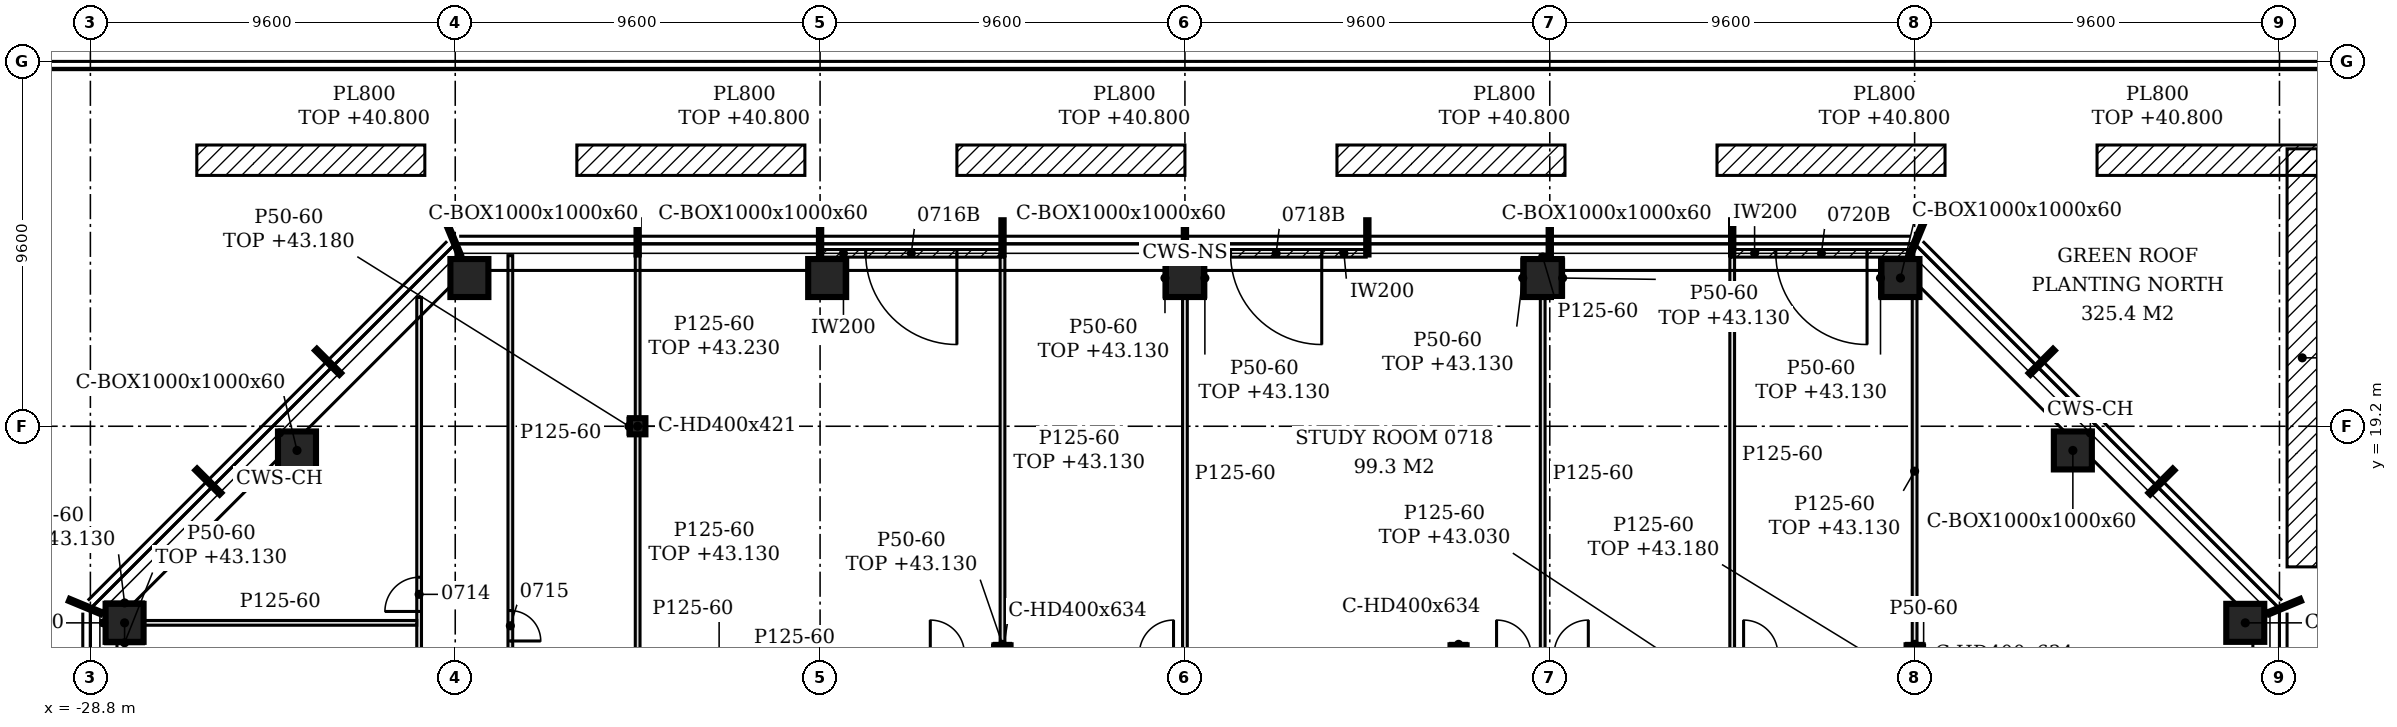
"""IFC4 building model, lengths in metres.
Left out: names, types, materials, properties, quantities, classifications, styles, units other than length and angle.
Written with IfcOpenShell. Run it as: python <this file> out.ifc"""

import sys

from ifc_helpers import new_model, si_unit, direction, frame, frame_2d, origin, origin_2d, place, context, subcontext, project, spatial, polyline, rectangle, hollow_rectangle, i_section, outline, extrude, element, fill, save


model = new_model("IFC4")
c1 = context("Model", 3, precision=1e-05, world=origin(), true_north=direction((0.0, 1.0)))
c2 = subcontext(c1, "Body", "Model", "MODEL_VIEW")
j1 = project(units=[si_unit("LENGTHUNIT", "METRE"), si_unit("PLANEANGLEUNIT", "RADIAN")], contexts=[c1])
p1 = place(None, origin())
s1 = spatial("IfcSite", under=j1, at=p1, CompositionType="ELEMENT")
p2 = place(p1, origin())
s2 = spatial("IfcBuilding", under=s1, at=p2, CompositionType="ELEMENT")
p3 = place(p2, frame((0.0, 0.0, 40.2)))
s3 = spatial("IfcBuildingStorey", under=s2, at=p3, CompositionType="ELEMENT", Elevation=40.2)
for number, where, z_axis, x_axis in (
    (1, (27.9, 14.027, -0.15), (0.0, 0.0, 1.0), (1.0, 0.0, 0.0)),
    (2, (23.364, 18.564, -0.15), (0.0, 0.0, 1.0), (1.0, 0.0, 0.0)),
    (3, (18.827, 23.1, -0.15), (0.0, 0.0, 1.0), (1.0, 0.0, 0.0)),
    (4, (9.414, 23.1, -0.15), (0.0, 0.0, 1.0), (1.0, 0.0, 0.0)),
    (5, (0.0, 23.1, -0.15), (0.0, 0.0, 1.0), (1.0, 0.0, 0.0)),
    (6, (-9.414, 23.1, -0.15), (0.0, 0.0, 1.0), (1.0, 0.0, 0.0)),
    (7, (-18.827, 23.1, -0.15), (0.0, 0.0, 1.0), (1.0, 0.0, 0.0)),
    (8, (-23.364, 18.564, -0.15), (0.0, 0.0, 1.0), (1.0, 0.0, 0.0)),
    (9, (-27.9, 14.027, -0.15), (0.0, 0.0, 1.0), (1.0, 0.0, 0.0)),
):
    element("IfcColumn", number, at=place(p3, frame(where, z_axis=z_axis, x_axis=x_axis)), inside=s3, PredefinedType="COLUMN", context=c2, shape_type="SweptSolid", body=[
        extrude(hollow_rectangle(XDim=1.0, YDim=1.0, WallThickness=0.06, at=origin_2d()), origin(), (0.0, 0.0, 1.0), 3.6),
    ])
for number, where, z_axis, x_axis in (
    (10, (-4.8, 13.2, -0.15), (0.0, 0.0, 1.0), (1.0, 0.0, 0.0)),
    (11, (7.2, 13.2, -0.15), (0.0, 0.0, 1.0), (1.0, 0.0, 0.0)),
    (12, (19.2, 13.2, -0.15), (0.0, 0.0, 1.0), (1.0, 0.0, 0.0)),
):
    element("IfcColumn", number, at=place(p3, frame(where, z_axis=z_axis, x_axis=x_axis)), inside=s3, PredefinedType="COLUMN", context=c2, shape_type="SweptSolid", body=[
        extrude(i_section(OverallWidth=0.424, OverallDepth=0.474, WebThickness=0.048, FlangeThickness=0.077, FilletRadius=0.015, at=origin_2d()), origin(), (0.0, 0.0, 1.0), 3.6),
    ])
p4 = place(p3, frame((-14.4, 19.2, -0.15), z_axis=(0.0, 0.0, 1.0), x_axis=(1.0, 0.0, 0.0)))
e13 = element("IfcColumn", 13, at=p4, inside=s3, PredefinedType="COLUMN", context=c2, shape_type="SweptSolid", body=[
    extrude(i_section(OverallWidth=0.409, OverallDepth=0.425, WebThickness=0.033, FlangeThickness=0.052, FilletRadius=0.015, at=origin_2d()), origin(), (0.0, 0.0, 1.0), 3.6),
])
for number, where, z_axis, x_axis in (
    (14, (-26.0, 26.2, 0.0), (0.0, 0.0, 1.0), (1.0, 0.0, 0.0)),
    (15, (-16.0, 26.2, 0.0), (0.0, 0.0, 1.0), (1.0, 0.0, 0.0)),
    (16, (-6.0, 26.2, 0.0), (0.0, 0.0, 1.0), (1.0, 0.0, 0.0)),
    (17, (4.0, 26.2, 0.0), (0.0, 0.0, 1.0), (1.0, 0.0, 0.0)),
    (18, (14.0, 26.2, 0.0), (0.0, 0.0, 1.0), (1.0, 0.0, 0.0)),
    (19, (24.0, 26.2, 0.0), (0.0, 0.0, 1.0), (1.0, 0.0, 0.0)),
):
    element("IfcWall", number, at=place(p3, frame(where, z_axis=z_axis, x_axis=x_axis)), inside=s3, PredefinedType="NOTDEFINED", context=c2, shape_type="SweptSolid", body=[
        extrude(rectangle(XDim=6.0, YDim=0.8, at=frame_2d((3.0, 0.0))), origin(), (0.0, 0.0, 1.0), 0.6),
    ])
p5 = place(p3, frame((29.4, 15.5, 0.0), z_axis=(0.0, 0.0, 1.0), x_axis=(0.0, 1.0, 0.0)))
e20 = element("IfcWall", 20, at=p5, inside=s3, PredefinedType="NOTDEFINED", context=c2, shape_type="SweptSolid", body=[
    extrude(rectangle(XDim=11.0, YDim=0.8, at=frame_2d((5.5, 0.0))), origin(), (0.0, 0.0, 1.0), 0.6),
])
p6 = place(p3, frame((19.056, 23.75, 0.0), z_axis=(0.0, 0.0, 1.0), x_axis=(-1.0, 0.0, 0.0)))
e21 = element("IfcWall", 21, at=p6, inside=s3, PredefinedType="NOTDEFINED", context=c2, shape_type="SweptSolid", body=[
    extrude(rectangle(XDim=4.626, YDim=0.2, at=frame_2d((2.313, 0.0))), origin(), (0.0, 0.0, 1.0), 3.45),
])
p7 = place(p6, frame((1.108, 0.0, 0.0)))
e22 = element("IfcOpeningElement", 22, at=p7, cuts=e21, PredefinedType="OPENING", context=c2, shape_type="SweptSolid", body=[
    extrude(rectangle(XDim=2.4, YDim=2.4, at=frame_2d((1.2, 1.2))), frame((0.0, 0.11, 0.0), z_axis=(0.0, -1.0, 0.0), x_axis=(1.0, 0.0, 0.0)), (0.0, 0.0, 1.0), 0.22),
])
p8 = place(p3, frame((4.77, 23.75, 0.0), z_axis=(0.0, 0.0, 1.0), x_axis=(-1.0, 0.0, 0.0)))
e23 = element("IfcWall", 23, at=p8, inside=s3, PredefinedType="NOTDEFINED", context=c2, shape_type="SweptSolid", body=[
    extrude(rectangle(XDim=4.74, YDim=0.2, at=frame_2d((2.37, 0.0))), origin(), (0.0, 0.0, 1.0), 3.45),
])
p9 = place(p8, frame((1.17, 0.0, 0.0)))
e24 = element("IfcOpeningElement", 24, at=p9, cuts=e23, PredefinedType="OPENING", context=c2, shape_type="SweptSolid", body=[
    extrude(rectangle(XDim=2.4, YDim=2.4, at=frame_2d((1.2, 1.2))), frame((0.0, 0.11, 0.0), z_axis=(0.0, -1.0, 0.0), x_axis=(1.0, 0.0, 0.0)), (0.0, 0.0, 1.0), 0.22),
])
p10 = place(p3, frame((-4.83, 23.75, 0.0), z_axis=(0.0, 0.0, 1.0), x_axis=(-1.0, 0.0, 0.0)))
e25 = element("IfcWall", 25, at=p10, inside=s3, PredefinedType="NOTDEFINED", context=c2, shape_type="SweptSolid", body=[
    extrude(rectangle(XDim=4.74, YDim=0.2, at=frame_2d((2.37, 0.0))), origin(), (0.0, 0.0, 1.0), 3.45),
])
p11 = place(p10, frame((1.17, 0.0, 0.0)))
e26 = element("IfcOpeningElement", 26, at=p11, cuts=e25, PredefinedType="OPENING", context=c2, shape_type="SweptSolid", body=[
    extrude(rectangle(XDim=2.4, YDim=2.4, at=frame_2d((1.2, 1.2))), frame((0.0, 0.11, 0.0), z_axis=(0.0, -1.0, 0.0), x_axis=(1.0, 0.0, 0.0)), (0.0, 0.0, 1.0), 0.22),
])
p12 = place(p3, frame((-20.15, -15.288, 0.0), z_axis=(0.0, 0.0, 1.0), x_axis=(0.0, 1.0, 0.0)))
e27 = element("IfcWall", 27, at=p12, inside=s3, PredefinedType="PARTITIONING", context=c2, shape_type="SweptSolid", body=[
    extrude(outline(polyline([(0.0, 0.0), (37.876, 0.0), (37.876, 3.45), (37.622, 3.45), (37.62, 2.63), (36.507, 2.63), (36.505, 3.45), (34.583, 3.45), (34.581, 2.98), (34.393, 2.98), (34.39, 3.45), (29.798, 3.45), (29.795, 2.83), (29.577, 2.83), (29.575, 3.45), (24.998, 3.45), (24.996, 2.83), (24.778, 2.83), (24.775, 3.45), (20.198, 3.45), (20.196, 2.83), (19.978, 2.83), (19.976, 3.45), (15.397, 3.45), (15.396, 2.83), (15.177, 2.83), (15.176, 3.45), (10.597, 3.45), (10.595, 2.83), (10.377, 2.83), (10.375, 3.45), (5.798, 3.45), (5.795, 2.83), (5.577, 2.83), (5.575, 3.45), (0.998, 3.45), (0.996, 2.83), (0.778, 2.83), (0.775, 3.45), (0.0, 3.45), (0.0, 0.0)])), frame((0.0, 0.062, 0.0), z_axis=(0.0, -1.0, 0.0), x_axis=(1.0, 0.0, 0.0)), (0.0, 0.0, 1.0), 0.125),
])
p13 = place(p12, frame((9.337, 0.0, 0.0)))
e28 = element("IfcOpeningElement", 28, at=p13, cuts=e27, PredefinedType="OPENING", context=c2, shape_type="SweptSolid", body=[
    extrude(rectangle(XDim=0.9, YDim=2.1, at=frame_2d((0.45, 1.05))), frame((0.0, 0.073, 0.0), z_axis=(0.0, -1.0, 0.0), x_axis=(1.0, 0.0, 0.0)), (0.0, 0.0, 1.0), 0.145),
])
p14 = place(p12, frame((10.912, 0.0, 0.0)))
e29 = element("IfcOpeningElement", 29, at=p14, cuts=e27, PredefinedType="OPENING", context=c2, shape_type="SweptSolid", body=[
    extrude(rectangle(XDim=0.9, YDim=2.1, at=frame_2d((0.45, 1.05))), frame((0.0, 0.073, 0.0), z_axis=(0.0, -1.0, 0.0), x_axis=(1.0, 0.0, 0.0)), (0.0, 0.0, 1.0), 0.145),
])
p15 = place(p12, frame((16.488, 0.0, 0.0)))
e30 = element("IfcOpeningElement", 30, at=p15, cuts=e27, PredefinedType="OPENING", context=c2, shape_type="SweptSolid", body=[
    extrude(rectangle(XDim=0.9, YDim=2.1, at=frame_2d((0.45, 1.05))), frame((0.0, 0.073, 0.0), z_axis=(0.0, -1.0, 0.0), x_axis=(1.0, 0.0, 0.0)), (0.0, 0.0, 1.0), 0.145),
])
p16 = place(p12, frame((23.664, 0.0, 0.0)))
e31 = element("IfcOpeningElement", 31, at=p16, cuts=e27, PredefinedType="OPENING", context=c2, shape_type="SweptSolid", body=[
    extrude(rectangle(XDim=0.9, YDim=2.1, at=frame_2d((0.45, 1.05))), frame((0.0, 0.073, 0.0), z_axis=(0.0, -1.0, 0.0), x_axis=(1.0, 0.0, 0.0)), (0.0, 0.0, 1.0), 0.145),
])
p17 = place(p12, frame((26.387, 0.0, 0.0)))
e32 = element("IfcOpeningElement", 32, at=p17, cuts=e27, PredefinedType="OPENING", context=c2, shape_type="SweptSolid", body=[
    extrude(rectangle(XDim=0.9, YDim=2.1, at=frame_2d((0.45, 1.05))), frame((0.0, 0.073, 0.0), z_axis=(0.0, -1.0, 0.0), x_axis=(1.0, 0.0, 0.0)), (0.0, 0.0, 1.0), 0.145),
])
p18 = place(p12, frame((29.615, 0.0, 0.0)))
e33 = element("IfcOpeningElement", 33, at=p18, cuts=e27, PredefinedType="OPENING", context=c2, shape_type="SweptSolid", body=[
    extrude(rectangle(XDim=0.9, YDim=2.1, at=frame_2d((0.45, 1.05))), frame((0.0, 0.073, 0.0), z_axis=(0.0, -1.0, 0.0), x_axis=(1.0, 0.0, 0.0)), (0.0, 0.0, 1.0), 0.145),
])
p19 = place(p3, frame((-17.75, 13.262, 0.0), z_axis=(0.0, 0.0, 1.0), x_axis=(0.0, 1.0, 0.0)))
e34 = element("IfcWall", 34, at=p19, inside=s3, PredefinedType="PARTITIONING", context=c2, shape_type="SweptSolid", body=[
    extrude(outline(polyline([(0.0, 0.0), (10.427, 0.0), (10.427, 3.45), (9.988, 3.45), (9.986, 2.93), (9.688, 2.93), (9.686, 3.45), (6.032, 3.45), (6.031, 2.98), (5.843, 2.98), (5.841, 3.45), (1.248, 3.45), (1.246, 2.83), (1.028, 2.83), (1.025, 3.45), (0.0, 3.45), (0.0, 0.0)])), frame((0.0, 0.062, 0.0), z_axis=(0.0, -1.0, 0.0), x_axis=(1.0, 0.0, 0.0)), (0.0, 0.0, 1.0), 0.125),
])
p20 = place(p19, frame((0.288, 0.0, 0.0)))
e35 = element("IfcOpeningElement", 35, at=p20, cuts=e34, PredefinedType="OPENING", context=c2, shape_type="SweptSolid", body=[
    extrude(rectangle(XDim=0.8, YDim=2.1, at=frame_2d((0.4, 1.05))), frame((0.0, 0.073, 0.0), z_axis=(0.0, -1.0, 0.0), x_axis=(1.0, 0.0, 0.0)), (0.0, 0.0, 1.0), 0.145),
])
p21 = place(p3, frame((-14.4, 13.262, 0.0), z_axis=(0.0, 0.0, 1.0), x_axis=(0.0, 1.0, 0.0)))
e36 = element("IfcWall", 36, at=p21, inside=s3, PredefinedType="PARTITIONING", context=c2, shape_type="SweptSolid", body=[
    extrude(rectangle(XDim=5.725, YDim=0.125, at=frame_2d((2.863, 0.0))), origin(), (0.0, 0.0, 1.0), 2.93),
])
for number, where, z_axis, x_axis in (
    (37, (0.0, 13.262, 0.0), (0.0, 0.0, 1.0), (0.0, 1.0, 0.0)),
    (38, (9.414, 13.262, 0.0), (0.0, 0.0, 1.0), (0.0, 1.0, 0.0)),
):
    element("IfcWall", number, at=place(p3, frame(where, z_axis=z_axis, x_axis=x_axis)), inside=s3, PredefinedType="PARTITIONING", context=c2, shape_type="SweptSolid", body=[
        extrude(outline(polyline([(0.0, 0.0), (9.338, 0.0), (9.337, 3.45), (6.042, 3.45), (6.041, 2.88), (5.833, 2.88), (5.831, 3.45), (0.087, 3.45), (0.085, 2.83), (0.0, 2.83), (0.0, 0.0)])), frame((0.0, 0.062, 0.0), z_axis=(0.0, -1.0, 0.0), x_axis=(1.0, 0.0, 0.0)), (0.0, 0.0, 1.0), 0.125),
    ])
p22 = place(p3, frame((14.4, 13.262, 0.0), z_axis=(0.0, 0.0, 1.0), x_axis=(0.0, 1.0, 0.0)))
e39 = element("IfcWall", 39, at=p22, inside=s3, PredefinedType="PARTITIONING", context=c2, shape_type="SweptSolid", body=[
    extrude(outline(polyline([(0.0, 0.0), (10.387, 0.0), (10.387, 3.45), (9.988, 3.45), (9.986, 2.93), (9.688, 2.93), (9.686, 3.45), (6.042, 3.45), (6.041, 2.88), (5.833, 2.88), (5.831, 3.45), (0.087, 3.45), (0.085, 2.83), (0.0, 2.83), (0.0, 0.0)])), frame((0.0, 0.062, 0.0), z_axis=(0.0, -1.0, 0.0), x_axis=(1.0, 0.0, 0.0)), (0.0, 0.0, 1.0), 0.125),
])
p23 = place(p3, frame((-4.8, 13.437, 0.0), z_axis=(0.0, 0.0, 1.0), x_axis=(0.0, 1.0, 0.0)))
e40 = element("IfcWall", 40, at=p23, inside=s3, PredefinedType="PARTITIONING", context=c2, shape_type="SweptSolid", body=[
    extrude(rectangle(XDim=10.213, YDim=0.125, at=frame_2d((5.106, 0.0))), origin(), (0.0, 0.0, 1.0), 2.93),
])
p24 = place(p3, frame((19.2, 13.437, 0.0), z_axis=(0.0, 0.0, 1.0), x_axis=(0.0, 1.0, 0.0)))
e41 = element("IfcWall", 41, at=p24, inside=s3, PredefinedType="PARTITIONING", context=c2, shape_type="SweptSolid", body=[
    extrude(outline(polyline([(0.0, 0.0), (9.163, 0.0), (9.163, 2.63), (8.733, 2.63), (8.731, 2.93), (0.0, 2.93), (0.0, 0.0)])), frame((0.0, 0.062, 0.0), z_axis=(0.0, -1.0, 0.0), x_axis=(1.0, 0.0, 0.0)), (0.0, 0.0, 1.0), 0.125),
])
p25 = place(p3, frame((-28.503, 14.027, 0.0), z_axis=(0.0, 0.0, 1.0), x_axis=(1.0, 0.0, 0.0)))
e42 = element("IfcWall", 42, at=p25, inside=s3, PredefinedType="PARTITIONING", context=c2, shape_type="SweptSolid", body=[
    extrude(rectangle(XDim=0.103, YDim=0.125, at=frame_2d((0.052, 0.0))), origin(), (0.0, 0.0, 1.0), 3.45),
])
p26 = place(p3, frame((-27.4, 14.027, 0.0), z_axis=(0.0, 0.0, 1.0), x_axis=(1.0, 0.0, 0.0)))
e43 = element("IfcWall", 43, at=p26, inside=s3, PredefinedType="PARTITIONING", context=c2, shape_type="SweptSolid", body=[
    extrude(rectangle(XDim=7.188, YDim=0.125, at=frame_2d((3.594, 0.0))), origin(), (0.0, 0.0, 1.0), 3.45),
])
p27 = place(p3, frame((-14.4, 19.413, 0.0), z_axis=(0.0, 0.0, 1.0), x_axis=(0.0, 1.0, 0.0)))
e44 = element("IfcWall", 44, at=p27, inside=s3, PredefinedType="PARTITIONING", context=c2, shape_type="SweptSolid", body=[
    extrude(outline(polyline([(0.0, 0.0), (4.277, 0.0), (4.278, 3.03), (3.837, 3.03), (3.835, 2.93), (3.538, 2.93), (3.535, 3.03), (0.0, 3.03), (0.0, 0.0)])), frame((0.0, 0.062, 0.0), z_axis=(0.0, -1.0, 0.0), x_axis=(1.0, 0.0, 0.0)), (0.0, 0.0, 1.0), 0.125),
])
p28 = place(p3, frame((9.414, 23.6, 0.0), z_axis=(0.0, 0.0, 1.0), x_axis=(0.0, 1.0, 0.0)))
e45 = element("IfcWall", 45, at=p28, inside=s3, PredefinedType="PARTITIONING", context=c2, shape_type="SweptSolid", body=[
    extrude(rectangle(XDim=0.103, YDim=0.125, at=frame_2d((0.051, 0.0))), origin(), (0.0, 0.0, 1.0), 3.45),
])
p29 = place(p3, frame((19.437, 12.963, 0.0), z_axis=(0.0, 0.0, 1.0), x_axis=(0.0, 1.0, 0.0)))
e46 = element("IfcWall", 46, at=p29, inside=s3, PredefinedType="PARTITIONING", context=c2, shape_type="SweptSolid", body=[
    extrude(rectangle(XDim=0.474, YDim=0.05, at=frame_2d((0.237, 0.0))), origin(), (0.0, 0.0, 1.0), 3.45),
])
for number, where, z_axis, x_axis in (
    (47, (-5.012, 13.462, 0.0), (0.0, 0.0, 1.0), (1.0, 0.0, 0.0)),
    (48, (6.988, 13.462, 0.0), (0.0, 0.0, 1.0), (1.0, 0.0, 0.0)),
    (49, (18.988, 13.462, 0.0), (0.0, 0.0, 1.0), (1.0, 0.0, 0.0)),
):
    element("IfcWall", number, at=place(p3, frame(where, z_axis=z_axis, x_axis=x_axis)), inside=s3, PredefinedType="PARTITIONING", context=c2, shape_type="SweptSolid", body=[
        extrude(rectangle(XDim=0.424, YDim=0.05, at=frame_2d((0.212, 0.0))), origin(), (0.0, 0.0, 1.0), 2.93),
    ])
p30 = place(p3, frame((18.302, 22.6, 0.0), z_axis=(0.0, 0.0, 1.0), x_axis=(0.0, 1.0, 0.0)))
e50 = element("IfcWall", 50, at=p30, inside=s3, PredefinedType="PARTITIONING", context=c2, shape_type="SweptSolid", body=[
    extrude(rectangle(XDim=1.0, YDim=0.05, at=frame_2d((0.5, 0.0))), origin(), (0.0, 0.0, 1.0), 2.93),
])
p31 = place(p3, frame((-14.629, 18.988, 0.0), z_axis=(0.0, 0.0, 1.0), x_axis=(0.0, 1.0, 0.0)))
e51 = element("IfcWall", 51, at=p31, inside=s3, PredefinedType="PARTITIONING", context=c2, shape_type="SweptSolid", body=[
    extrude(rectangle(XDim=0.425, YDim=0.05, at=frame_2d((0.212, 0.0))), origin(), (0.0, 0.0, 1.0), 2.98),
])
p32 = place(p3, frame((-5.037, 12.963, 0.0), z_axis=(0.0, 0.0, 1.0), x_axis=(0.0, 1.0, 0.0)))
e52 = element("IfcWall", 52, at=p32, inside=s3, PredefinedType="PARTITIONING", context=c2, shape_type="SweptSolid", body=[
    extrude(rectangle(XDim=0.474, YDim=0.05, at=frame_2d((0.237, 0.0))), origin(), (0.0, 0.0, 1.0), 3.45),
])
for number, where, z_axis, x_axis in (
    (53, (-0.525, 22.6, 0.0), (0.0, 0.0, 1.0), (0.0, 1.0, 0.0)),
    (54, (0.525, 22.6, 0.0), (0.0, 0.0, 1.0), (0.0, 1.0, 0.0)),
    (55, (8.889, 22.6, 0.0), (0.0, 0.0, 1.0), (0.0, 1.0, 0.0)),
    (56, (9.939, 22.6, 0.0), (0.0, 0.0, 1.0), (0.0, 1.0, 0.0)),
    (57, (-28.4, 14.552, 0.0), (0.0, 0.0, 1.0), (1.0, 0.0, 0.0)),
    (58, (-28.4, 13.502, 0.0), (0.0, 0.0, 1.0), (1.0, 0.0, 0.0)),
):
    element("IfcWall", number, at=place(p3, frame(where, z_axis=z_axis, x_axis=x_axis)), inside=s3, PredefinedType="PARTITIONING", context=c2, shape_type="SweptSolid", body=[
        extrude(rectangle(XDim=1.0, YDim=0.05, at=frame_2d((0.5, 0.0))), origin(), (0.0, 0.0, 1.0), 2.93),
    ])
p33 = place(p7, origin())
e59 = element("IfcDoor", 59, at=p33, inside=s3, OperationType="SINGLE_SWING_LEFT", PredefinedType="DOOR", context=c2, shape_type="SweptSolid", body=[
    extrude(rectangle(XDim=2.4, YDim=2.4, at=frame_2d((1.2, 1.2))), frame((0.0, 0.025, 0.0), z_axis=(0.0, -1.0, 0.0), x_axis=(1.0, 0.0, 0.0)), (0.0, 0.0, 1.0), 0.05),
])
fill(e22, e59)
p34 = place(p9, origin())
e60 = element("IfcDoor", 60, at=p34, inside=s3, OperationType="SINGLE_SWING_LEFT", PredefinedType="DOOR", context=c2, shape_type="SweptSolid", body=[
    extrude(rectangle(XDim=2.4, YDim=2.4, at=frame_2d((1.2, 1.2))), frame((0.0, 0.025, 0.0), z_axis=(0.0, -1.0, 0.0), x_axis=(1.0, 0.0, 0.0)), (0.0, 0.0, 1.0), 0.05),
])
fill(e24, e60)
p35 = place(p11, origin())
e61 = element("IfcDoor", 61, at=p35, inside=s3, OperationType="SINGLE_SWING_LEFT", PredefinedType="DOOR", context=c2, shape_type="SweptSolid", body=[
    extrude(rectangle(XDim=2.4, YDim=2.4, at=frame_2d((1.2, 1.2))), frame((0.0, 0.025, 0.0), z_axis=(0.0, -1.0, 0.0), x_axis=(1.0, 0.0, 0.0)), (0.0, 0.0, 1.0), 0.05),
])
fill(e26, e61)
p36 = place(p18, origin())
e62 = element("IfcDoor", 62, at=p36, inside=s3, OperationType="SINGLE_SWING_LEFT", PredefinedType="DOOR", context=c2, shape_type="SweptSolid", body=[
    extrude(rectangle(XDim=0.9, YDim=2.1, at=frame_2d((0.45, 1.05))), frame((0.0, 0.025, 0.0), z_axis=(0.0, -1.0, 0.0), x_axis=(1.0, 0.0, 0.0)), (0.0, 0.0, 1.0), 0.05),
])
fill(e33, e62)
p37 = place(p20, frame((0.8, 0.0, 0.0), z_axis=(0.0, 0.0, 1.0), x_axis=(-1.0, 0.0, 0.0)))
e63 = element("IfcDoor", 63, at=p37, inside=s3, OperationType="SINGLE_SWING_RIGHT", PredefinedType="DOOR", context=c2, shape_type="SweptSolid", body=[
    extrude(rectangle(XDim=0.8, YDim=2.1, at=frame_2d((0.4, 1.05))), frame((0.0, 0.025, 0.0), z_axis=(0.0, -1.0, 0.0), x_axis=(1.0, 0.0, 0.0)), (0.0, 0.0, 1.0), 0.05),
])
fill(e35, e63)
save(model, sys.argv[1])
